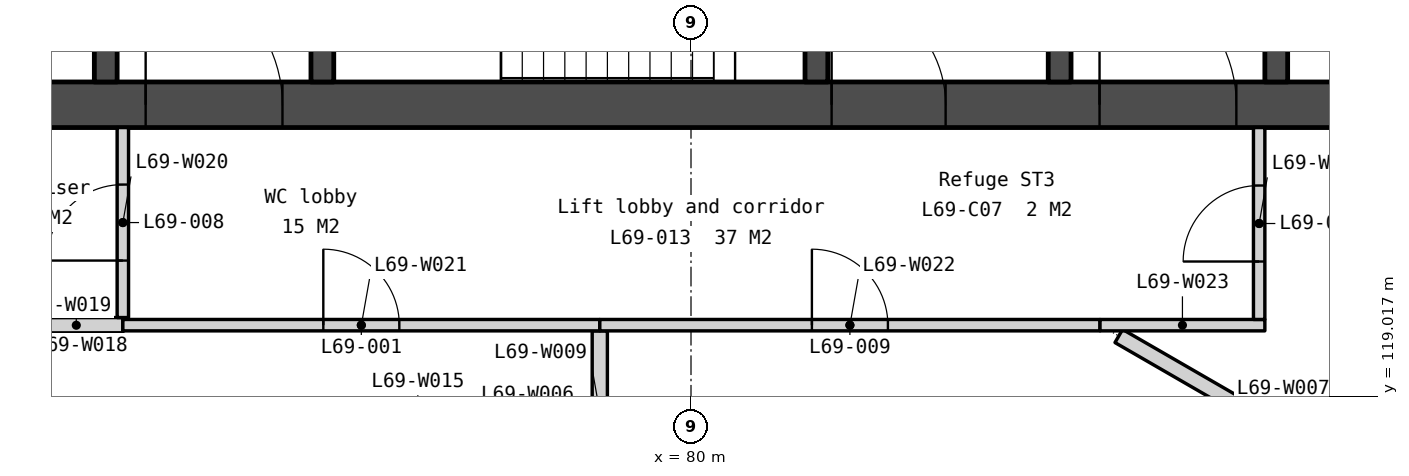
"""IFC4 building model, lengths in metres.
Left out: names, types, materials, properties, quantities, classifications, styles, units other than length and angle.
Written with IfcOpenShell. Run it as: python <this file> out.ifc"""

import sys

from ifc_helpers import new_model, si_unit, direction, frame, frame_2d, origin, place, context, subcontext, project, spatial, polyline, rectangle, outline, extrude, element, fill, save


model = new_model("IFC4")
c1 = context("Model", 3, precision=1e-05, world=origin(), true_north=direction((0.0, 1.0)))
c2 = subcontext(c1, "Body", "Model", "MODEL_VIEW")
j1 = project(units=[si_unit("LENGTHUNIT", "METRE"), si_unit("PLANEANGLEUNIT", "RADIAN")], contexts=[c1])
p1 = place(None, origin())
s1 = spatial("IfcSite", under=j1, at=p1, CompositionType="ELEMENT")
p2 = place(p1, origin())
s2 = spatial("IfcBuilding", under=s1, at=p2, CompositionType="ELEMENT")
p3 = place(p2, frame((0.0, 0.0, 281.6)))
s3 = spatial("IfcBuildingStorey", under=s2, at=p3, CompositionType="ELEMENT", Elevation=281.6)
p4 = place(p3, frame((69.0, 122.85, 0.0), z_axis=(0.0, 0.0, 1.0), x_axis=(1.0, 0.0, 0.0)))
e1 = element("IfcWall", 1, at=p4, inside=s3, PredefinedType="SOLIDWALL", context=c2, shape_type="SweptSolid", body=[
    extrude(rectangle(XDim=22.0, YDim=0.6, at=frame_2d((11.0, 0.0))), origin(), (0.0, 0.0, 1.0), 3.5),
])
p5 = place(p4, frame((16.375, 0.0, 0.0)))
e2 = element("IfcOpeningElement", 2, at=p5, cuts=e1, PredefinedType="OPENING", context=c2, shape_type="SweptSolid", body=[
    extrude(rectangle(XDim=1.8, YDim=2.1, at=frame_2d((0.9, 1.05))), frame((0.0, 0.31, 0.0), z_axis=(0.0, -1.0, 0.0), x_axis=(1.0, 0.0, 0.0)), (0.0, 0.0, 1.0), 0.62),
])
p6 = place(p4, frame((3.825, 0.0, 0.0)))
e3 = element("IfcOpeningElement", 3, at=p6, cuts=e1, PredefinedType="OPENING", context=c2, shape_type="SweptSolid", body=[
    extrude(rectangle(XDim=1.8, YDim=2.1, at=frame_2d((0.9, 1.05))), frame((0.0, 0.31, 0.0), z_axis=(0.0, -1.0, 0.0), x_axis=(1.0, 0.0, 0.0)), (0.0, 0.0, 1.0), 0.62),
])
p7 = place(p4, frame((12.85, 0.0, 0.0)))
e4 = element("IfcOpeningElement", 4, at=p7, cuts=e1, PredefinedType="OPENING", context=c2, shape_type="SweptSolid", body=[
    extrude(rectangle(XDim=1.5, YDim=2.1, at=frame_2d((0.75, 1.05))), frame((0.0, 0.31, 0.0), z_axis=(0.0, -1.0, 0.0), x_axis=(1.0, 0.0, 0.0)), (0.0, 0.0, 1.0), 0.62),
])
p8 = place(p3, frame((72.3, 133.95, 0.0), z_axis=(0.0, 0.0, 1.0), x_axis=(0.0, -1.0, 0.0)))
e5 = element("IfcWall", 5, at=p8, inside=s3, PredefinedType="SOLIDWALL", context=c2, shape_type="SweptSolid", body=[
    extrude(rectangle(XDim=10.8, YDim=0.3, at=frame_2d((5.4, 0.0))), origin(), (0.0, 0.0, 1.0), 3.5),
])
p9 = place(p8, frame((6.95, 0.0, 0.0)))
e6 = element("IfcOpeningElement", 6, at=p9, cuts=e5, PredefinedType="OPENING", context=c2, shape_type="SweptSolid", body=[
    extrude(rectangle(XDim=1.1, YDim=2.1, at=frame_2d((0.55, 1.05))), frame((0.0, 0.16, 0.0), z_axis=(0.0, -1.0, 0.0), x_axis=(1.0, 0.0, 0.0)), (0.0, 0.0, 1.0), 0.32),
])
p10 = place(p8, frame((9.35, 0.0, 0.0)))
e7 = element("IfcOpeningElement", 7, at=p10, cuts=e5, PredefinedType="OPENING", context=c2, shape_type="SweptSolid", body=[
    extrude(rectangle(XDim=0.9, YDim=2.1, at=frame_2d((0.45, 1.05))), frame((0.0, 0.16, 0.0), z_axis=(0.0, -1.0, 0.0), x_axis=(1.0, 0.0, 0.0)), (0.0, 0.0, 1.0), 0.32),
])
p11 = place(p8, frame((5.1, 0.0, 0.0)))
e8 = element("IfcOpeningElement", 8, at=p11, cuts=e5, PredefinedType="OPENING", context=c2, shape_type="SweptSolid", body=[
    extrude(rectangle(XDim=1.0, YDim=2.1, at=frame_2d((0.5, 1.05))), frame((0.0, 0.16, 0.0), z_axis=(0.0, -1.0, 0.0), x_axis=(1.0, 0.0, 0.0)), (0.0, 0.0, 1.0), 0.32),
])
p12 = place(p3, frame((75.15, 125.7, 0.0), z_axis=(0.0, 0.0, 1.0), x_axis=(0.0, -1.0, 0.0)))
e9 = element("IfcWall", 9, at=p12, inside=s3, PredefinedType="SOLIDWALL", context=c2, shape_type="SweptSolid", body=[
    extrude(rectangle(XDim=2.55, YDim=0.3, at=frame_2d((1.275, 0.0))), origin(), (0.0, 0.0, 1.0), 3.5),
])
p13 = place(p3, frame((81.65, 125.7, 0.0), z_axis=(0.0, 0.0, 1.0), x_axis=(0.0, -1.0, 0.0)))
e10 = element("IfcWall", 10, at=p13, inside=s3, PredefinedType="SOLIDWALL", context=c2, shape_type="SweptSolid", body=[
    extrude(rectangle(XDim=2.55, YDim=0.3, at=frame_2d((1.275, 0.0))), origin(), (0.0, 0.0, 1.0), 3.5),
])
p14 = place(p13, frame((0.75, 0.0, 0.0)))
e11 = element("IfcOpeningElement", 11, at=p14, cuts=e10, PredefinedType="OPENING", context=c2, shape_type="SweptSolid", body=[
    extrude(rectangle(XDim=1.0, YDim=2.1, at=frame_2d((0.5, 1.05))), frame((0.0, 0.16, 0.0), z_axis=(0.0, -1.0, 0.0), x_axis=(1.0, 0.0, 0.0)), (0.0, 0.0, 1.0), 0.32),
])
p15 = place(p3, frame((84.85, 125.85, 0.0), z_axis=(0.0, 0.0, 1.0), x_axis=(0.0, -1.0, 0.0)))
e12 = element("IfcWall", 12, at=p15, inside=s3, PredefinedType="SOLIDWALL", context=c2, shape_type="SweptSolid", body=[
    extrude(rectangle(XDim=2.7, YDim=0.3, at=frame_2d((1.35, 0.0))), origin(), (0.0, 0.0, 1.0), 3.5),
])
p16 = place(p3, frame((87.7, 133.95, 0.0), z_axis=(0.0, 0.0, 1.0), x_axis=(0.0, -1.0, 0.0)))
e13 = element("IfcWall", 13, at=p16, inside=s3, PredefinedType="SOLIDWALL", context=c2, shape_type="SweptSolid", body=[
    extrude(rectangle(XDim=10.8, YDim=0.3, at=frame_2d((5.4, 0.0))), origin(), (0.0, 0.0, 1.0), 3.5),
])
p17 = place(p16, frame((6.95, 0.0, 0.0)))
e14 = element("IfcOpeningElement", 14, at=p17, cuts=e13, PredefinedType="OPENING", context=c2, shape_type="SweptSolid", body=[
    extrude(rectangle(XDim=1.1, YDim=2.1, at=frame_2d((0.55, 1.05))), frame((0.0, 0.16, 0.0), z_axis=(0.0, -1.0, 0.0), x_axis=(1.0, 0.0, 0.0)), (0.0, 0.0, 1.0), 0.32),
])
p18 = place(p16, frame((5.1, 0.0, 0.0)))
e15 = element("IfcOpeningElement", 15, at=p18, cuts=e13, PredefinedType="OPENING", context=c2, shape_type="SweptSolid", body=[
    extrude(rectangle(XDim=1.0, YDim=2.1, at=frame_2d((0.5, 1.05))), frame((0.0, 0.16, 0.0), z_axis=(0.0, -1.0, 0.0), x_axis=(1.0, 0.0, 0.0)), (0.0, 0.0, 1.0), 0.32),
])
p19 = place(p16, frame((9.25, 0.0, 0.0)))
e16 = element("IfcOpeningElement", 16, at=p19, cuts=e13, PredefinedType="OPENING", context=c2, shape_type="SweptSolid", body=[
    extrude(rectangle(XDim=1.1, YDim=2.1, at=frame_2d((0.55, 1.05))), frame((0.0, 0.16, 0.0), z_axis=(0.0, -1.0, 0.0), x_axis=(1.0, 0.0, 0.0)), (0.0, 0.0, 1.0), 0.32),
])
p20 = place(p3, frame((60.609, 133.207, -0.15), z_axis=(0.0, 0.0, 1.0), x_axis=(0.500002536638, -0.866023939251, 0.0)))
e17 = element("IfcWall", 17, at=p20, inside=s3, PredefinedType="SOLIDWALL", context=c2, shape_type="SweptSolid", body=[
    extrude(outline(polyline([(36.972, 0.0), (36.972, 3.55), (0.0, 3.55), (0.0, 0.0), (36.972, 0.0)])), frame((0.0, 0.225, 0.0), z_axis=(0.0, -1.0, 0.0), x_axis=(1.0, 0.0, 0.0)), (0.0, 0.0, 1.0), 0.45),
])
p21 = place(p20, frame((3.172, 0.0, 0.95)))
e18 = element("IfcOpeningElement", 18, at=p21, cuts=e17, PredefinedType="OPENING", context=c2, shape_type="SweptSolid", body=[
    extrude(rectangle(XDim=1.2, YDim=2.2, at=frame_2d((0.6, 1.1))), frame((0.0, 0.235, 0.0), z_axis=(0.0, -1.0, 0.0), x_axis=(1.0, 0.0, 0.0)), (0.0, 0.0, 1.0), 0.47),
])
p22 = place(p20, frame((4.872, 0.0, 0.95)))
e19 = element("IfcOpeningElement", 19, at=p22, cuts=e17, PredefinedType="OPENING", context=c2, shape_type="SweptSolid", body=[
    extrude(rectangle(XDim=1.2, YDim=2.2, at=frame_2d((0.6, 1.1))), frame((0.0, 0.235, 0.0), z_axis=(0.0, -1.0, 0.0), x_axis=(1.0, 0.0, 0.0)), (0.0, 0.0, 1.0), 0.47),
])
p23 = place(p20, frame((12.415, 0.0, 0.95)))
e20 = element("IfcOpeningElement", 20, at=p23, cuts=e17, PredefinedType="OPENING", context=c2, shape_type="SweptSolid", body=[
    extrude(rectangle(XDim=1.2, YDim=2.2, at=frame_2d((0.6, 1.1))), frame((0.0, 0.235, 0.0), z_axis=(0.0, -1.0, 0.0), x_axis=(1.0, 0.0, 0.0)), (0.0, 0.0, 1.0), 0.47),
])
p24 = place(p20, frame((14.115, 0.0, 0.95)))
e21 = element("IfcOpeningElement", 21, at=p24, cuts=e17, PredefinedType="OPENING", context=c2, shape_type="SweptSolid", body=[
    extrude(rectangle(XDim=1.2, YDim=2.2, at=frame_2d((0.6, 1.1))), frame((0.0, 0.235, 0.0), z_axis=(0.0, -1.0, 0.0), x_axis=(1.0, 0.0, 0.0)), (0.0, 0.0, 1.0), 0.47),
])
p25 = place(p20, frame((21.658, 0.0, 0.95)))
e22 = element("IfcOpeningElement", 22, at=p25, cuts=e17, PredefinedType="OPENING", context=c2, shape_type="SweptSolid", body=[
    extrude(rectangle(XDim=1.2, YDim=2.2, at=frame_2d((0.6, 1.1))), frame((0.0, 0.235, 0.0), z_axis=(0.0, -1.0, 0.0), x_axis=(1.0, 0.0, 0.0)), (0.0, 0.0, 1.0), 0.47),
])
p26 = place(p20, frame((23.358, 0.0, 0.95)))
e23 = element("IfcOpeningElement", 23, at=p26, cuts=e17, PredefinedType="OPENING", context=c2, shape_type="SweptSolid", body=[
    extrude(rectangle(XDim=1.2, YDim=2.2, at=frame_2d((0.6, 1.1))), frame((0.0, 0.235, 0.0), z_axis=(0.0, -1.0, 0.0), x_axis=(1.0, 0.0, 0.0)), (0.0, 0.0, 1.0), 0.47),
])
p27 = place(p20, frame((30.901, 0.0, 0.95)))
e24 = element("IfcOpeningElement", 24, at=p27, cuts=e17, PredefinedType="OPENING", context=c2, shape_type="SweptSolid", body=[
    extrude(rectangle(XDim=1.2, YDim=2.2, at=frame_2d((0.6, 1.1))), frame((0.0, 0.235, 0.0), z_axis=(0.0, -1.0, 0.0), x_axis=(1.0, 0.0, 0.0)), (0.0, 0.0, 1.0), 0.47),
])
p28 = place(p20, frame((32.601, 0.0, 0.95)))
e25 = element("IfcOpeningElement", 25, at=p28, cuts=e17, PredefinedType="OPENING", context=c2, shape_type="SweptSolid", body=[
    extrude(rectangle(XDim=1.2, YDim=2.2, at=frame_2d((0.6, 1.1))), frame((0.0, 0.235, 0.0), z_axis=(0.0, -1.0, 0.0), x_axis=(1.0, 0.0, 0.0)), (0.0, 0.0, 1.0), 0.47),
])
p29 = place(p3, frame((80.905, 101.188, -0.15), z_axis=(0.0, 0.0, 1.0), x_axis=(0.500002536638, 0.866023939251, 0.0)))
e26 = element("IfcWall", 26, at=p29, inside=s3, PredefinedType="SOLIDWALL", context=c2, shape_type="SweptSolid", body=[
    extrude(outline(polyline([(36.972, 0.0), (36.972, 3.55), (0.0, 3.55), (0.0, 0.0), (36.972, 0.0)])), frame((0.0, 0.225, 0.0), z_axis=(0.0, -1.0, 0.0), x_axis=(1.0, 0.0, 0.0)), (0.0, 0.0, 1.0), 0.45),
])
p30 = place(p29, frame((3.172, 0.0, 0.95)))
e27 = element("IfcOpeningElement", 27, at=p30, cuts=e26, PredefinedType="OPENING", context=c2, shape_type="SweptSolid", body=[
    extrude(rectangle(XDim=1.2, YDim=2.2, at=frame_2d((0.6, 1.1))), frame((0.0, 0.235, 0.0), z_axis=(0.0, -1.0, 0.0), x_axis=(1.0, 0.0, 0.0)), (0.0, 0.0, 1.0), 0.47),
])
p31 = place(p29, frame((4.872, 0.0, 0.95)))
e28 = element("IfcOpeningElement", 28, at=p31, cuts=e26, PredefinedType="OPENING", context=c2, shape_type="SweptSolid", body=[
    extrude(rectangle(XDim=1.2, YDim=2.2, at=frame_2d((0.6, 1.1))), frame((0.0, 0.235, 0.0), z_axis=(0.0, -1.0, 0.0), x_axis=(1.0, 0.0, 0.0)), (0.0, 0.0, 1.0), 0.47),
])
p32 = place(p29, frame((12.415, 0.0, 0.95)))
e29 = element("IfcOpeningElement", 29, at=p32, cuts=e26, PredefinedType="OPENING", context=c2, shape_type="SweptSolid", body=[
    extrude(rectangle(XDim=1.2, YDim=2.2, at=frame_2d((0.6, 1.1))), frame((0.0, 0.235, 0.0), z_axis=(0.0, -1.0, 0.0), x_axis=(1.0, 0.0, 0.0)), (0.0, 0.0, 1.0), 0.47),
])
p33 = place(p29, frame((14.115, 0.0, 0.95)))
e30 = element("IfcOpeningElement", 30, at=p33, cuts=e26, PredefinedType="OPENING", context=c2, shape_type="SweptSolid", body=[
    extrude(rectangle(XDim=1.2, YDim=2.2, at=frame_2d((0.6, 1.1))), frame((0.0, 0.235, 0.0), z_axis=(0.0, -1.0, 0.0), x_axis=(1.0, 0.0, 0.0)), (0.0, 0.0, 1.0), 0.47),
])
p34 = place(p29, frame((21.658, 0.0, 0.95)))
e31 = element("IfcOpeningElement", 31, at=p34, cuts=e26, PredefinedType="OPENING", context=c2, shape_type="SweptSolid", body=[
    extrude(rectangle(XDim=1.2, YDim=2.2, at=frame_2d((0.6, 1.1))), frame((0.0, 0.235, 0.0), z_axis=(0.0, -1.0, 0.0), x_axis=(1.0, 0.0, 0.0)), (0.0, 0.0, 1.0), 0.47),
])
p35 = place(p29, frame((23.358, 0.0, 0.95)))
e32 = element("IfcOpeningElement", 32, at=p35, cuts=e26, PredefinedType="OPENING", context=c2, shape_type="SweptSolid", body=[
    extrude(rectangle(XDim=1.2, YDim=2.2, at=frame_2d((0.6, 1.1))), frame((0.0, 0.235, 0.0), z_axis=(0.0, -1.0, 0.0), x_axis=(1.0, 0.0, 0.0)), (0.0, 0.0, 1.0), 0.47),
])
p36 = place(p29, frame((30.901, 0.0, 0.95)))
e33 = element("IfcOpeningElement", 33, at=p36, cuts=e26, PredefinedType="OPENING", context=c2, shape_type="SweptSolid", body=[
    extrude(rectangle(XDim=1.2, YDim=2.2, at=frame_2d((0.6, 1.1))), frame((0.0, 0.235, 0.0), z_axis=(0.0, -1.0, 0.0), x_axis=(1.0, 0.0, 0.0)), (0.0, 0.0, 1.0), 0.47),
])
p37 = place(p29, frame((32.601, 0.0, 0.95)))
e34 = element("IfcOpeningElement", 34, at=p37, cuts=e26, PredefinedType="OPENING", context=c2, shape_type="SweptSolid", body=[
    extrude(rectangle(XDim=1.2, YDim=2.2, at=frame_2d((0.6, 1.1))), frame((0.0, 0.235, 0.0), z_axis=(0.0, -1.0, 0.0), x_axis=(1.0, 0.0, 0.0)), (0.0, 0.0, 1.0), 0.47),
])
p38 = place(p3, frame((85.628, 119.808, 0.0), z_axis=(0.0, 0.0, 1.0), x_axis=(0.86602359872, -0.50000312645, 0.0)))
e35 = element("IfcWall", 35, at=p38, inside=s3, PredefinedType="PARTITIONING", context=c2, shape_type="SweptSolid", body=[
    extrude(rectangle(XDim=4.995, YDim=0.2, at=frame_2d((2.497, 0.0))), origin(), (0.0, 0.0, 1.0), 3.5),
])
p39 = place(p3, frame((78.8, 117.74, 0.0), z_axis=(0.0, 0.0, 1.0), x_axis=(0.0, 1.0, 0.0)))
e36 = element("IfcWall", 36, at=p39, inside=s3, PredefinedType="PARTITIONING", context=c2, shape_type="SweptSolid", body=[
    extrude(rectangle(XDim=2.135, YDim=0.2, at=frame_2d((1.067, 0.0))), origin(), (0.0, 0.0, 1.0), 3.5),
])
p40 = place(p3, frame((71.3, 119.948, 0.0), z_axis=(0.0, 0.0, 1.0), x_axis=(0.999999026632, 0.001395254771, 0.0)))
e37 = element("IfcWall", 37, at=p40, inside=s3, PredefinedType="PARTITIONING", context=c2, shape_type="SweptSolid", body=[
    extrude(rectangle(XDim=1.225, YDim=0.2, at=frame_2d((0.612, 0.0))), origin(), (0.0, 0.0, 1.0), 3.5),
])
p41 = place(p3, frame((72.525, 120.05, 0.0), z_axis=(0.0, 0.0, 1.0), x_axis=(0.0, 1.0, 0.0)))
e38 = element("IfcWall", 38, at=p41, inside=s3, PredefinedType="PARTITIONING", context=c2, shape_type="SweptSolid", body=[
    extrude(rectangle(XDim=2.5, YDim=0.15, at=frame_2d((1.25, 0.0))), origin(), (0.0, 0.0, 1.0), 3.5),
])
p42 = place(p41, frame((0.75, 0.0, 0.0)))
e39 = element("IfcOpeningElement", 39, at=p42, cuts=e38, PredefinedType="OPENING", context=c2, shape_type="SweptSolid", body=[
    extrude(rectangle(XDim=1.0, YDim=2.1, at=frame_2d((0.5, 1.05))), frame((0.0, 0.085, 0.0), z_axis=(0.0, -1.0, 0.0), x_axis=(1.0, 0.0, 0.0)), (0.0, 0.0, 1.0), 0.17),
])
p43 = place(p3, frame((72.525, 119.95, 0.0), z_axis=(0.0, 0.0, 1.0), x_axis=(1.0, 0.0, 0.0)))
e40 = element("IfcWall", 40, at=p43, inside=s3, PredefinedType="PARTITIONING", context=c2, shape_type="SweptSolid", body=[
    extrude(rectangle(XDim=6.275, YDim=0.15, at=frame_2d((3.138, 0.0))), origin(), (0.0, 0.0, 1.0), 3.5),
])
p44 = place(p43, frame((2.637, 0.0, 0.0)))
e41 = element("IfcOpeningElement", 41, at=p44, cuts=e40, PredefinedType="OPENING", context=c2, shape_type="SweptSolid", body=[
    extrude(rectangle(XDim=1.0, YDim=2.1, at=frame_2d((0.5, 1.05))), frame((0.0, 0.085, 0.0), z_axis=(0.0, -1.0, 0.0), x_axis=(1.0, 0.0, 0.0)), (0.0, 0.0, 1.0), 0.17),
])
p45 = place(p3, frame((78.8, 119.95, 0.0), z_axis=(0.0, 0.0, 1.0), x_axis=(1.0, 0.0, 0.0)))
e42 = element("IfcWall", 42, at=p45, inside=s3, PredefinedType="PARTITIONING", context=c2, shape_type="SweptSolid", body=[
    extrude(rectangle(XDim=6.581, YDim=0.15, at=frame_2d((3.291, 0.0))), origin(), (0.0, 0.0, 1.0), 3.5),
])
p46 = place(p45, frame((2.791, 0.0, 0.0)))
e43 = element("IfcOpeningElement", 43, at=p46, cuts=e42, PredefinedType="OPENING", context=c2, shape_type="SweptSolid", body=[
    extrude(rectangle(XDim=1.0, YDim=2.1, at=frame_2d((0.5, 1.05))), frame((0.0, 0.085, 0.0), z_axis=(0.0, -1.0, 0.0), x_axis=(1.0, 0.0, 0.0)), (0.0, 0.0, 1.0), 0.17),
])
p47 = place(p3, frame((85.381, 119.95, 0.0), z_axis=(0.0, 0.0, 1.0), x_axis=(1.0, 0.0, 0.0)))
e44 = element("IfcWall", 44, at=p47, inside=s3, PredefinedType="PARTITIONING", context=c2, shape_type="SweptSolid", body=[
    extrude(rectangle(XDim=2.169, YDim=0.15, at=frame_2d((1.084, 0.0))), origin(), (0.0, 0.0, 1.0), 3.5),
])
p48 = place(p3, frame((87.475, 120.025, 0.0), z_axis=(0.0, 0.0, 1.0), x_axis=(0.0, 1.0, 0.0)))
e45 = element("IfcWall", 45, at=p48, inside=s3, PredefinedType="PARTITIONING", context=c2, shape_type="SweptSolid", body=[
    extrude(rectangle(XDim=2.525, YDim=0.15, at=frame_2d((1.263, 0.0))), origin(), (0.0, 0.0, 1.0), 3.5),
])
p49 = place(p48, frame((0.762, 0.0, 0.0)))
e46 = element("IfcOpeningElement", 46, at=p49, cuts=e45, PredefinedType="OPENING", context=c2, shape_type="SweptSolid", body=[
    extrude(rectangle(XDim=1.0, YDim=2.1, at=frame_2d((0.5, 1.05))), frame((0.0, 0.085, 0.0), z_axis=(0.0, -1.0, 0.0), x_axis=(1.0, 0.0, 0.0)), (0.0, 0.0, 1.0), 0.17),
])
p50 = place(p5, origin())
e47 = element("IfcDoor", 47, at=p50, inside=s3, OperationType="DOUBLE_DOOR_DOUBLE_SWING", PredefinedType="DOOR", context=c2, shape_type="SweptSolid", body=[
    extrude(rectangle(XDim=1.8, YDim=2.1, at=frame_2d((0.9, 1.05))), frame((0.0, 0.025, 0.0), z_axis=(0.0, -1.0, 0.0), x_axis=(1.0, 0.0, 0.0)), (0.0, 0.0, 1.0), 0.05),
])
fill(e2, e47)
p51 = place(p6, origin())
e48 = element("IfcDoor", 48, at=p51, inside=s3, OperationType="DOUBLE_DOOR_DOUBLE_SWING", PredefinedType="DOOR", context=c2, shape_type="SweptSolid", body=[
    extrude(rectangle(XDim=1.8, YDim=2.1, at=frame_2d((0.9, 1.05))), frame((0.0, 0.025, 0.0), z_axis=(0.0, -1.0, 0.0), x_axis=(1.0, 0.0, 0.0)), (0.0, 0.0, 1.0), 0.05),
])
fill(e3, e48)
p52 = place(p7, origin())
e49 = element("IfcDoor", 49, at=p52, inside=s3, OperationType="DOUBLE_DOOR_DOUBLE_SWING", PredefinedType="DOOR", context=c2, shape_type="SweptSolid", body=[
    extrude(rectangle(XDim=1.5, YDim=2.1, at=frame_2d((0.75, 1.05))), frame((0.0, 0.025, 0.0), z_axis=(0.0, -1.0, 0.0), x_axis=(1.0, 0.0, 0.0)), (0.0, 0.0, 1.0), 0.05),
])
fill(e4, e49)
p53 = place(p44, origin())
e50 = element("IfcDoor", 50, at=p53, inside=s3, OperationType="SINGLE_SWING_LEFT", PredefinedType="DOOR", context=c2, shape_type="SweptSolid", body=[
    extrude(rectangle(XDim=1.0, YDim=2.1, at=frame_2d((0.5, 1.05))), frame((0.0, 0.025, 0.0), z_axis=(0.0, -1.0, 0.0), x_axis=(1.0, 0.0, 0.0)), (0.0, 0.0, 1.0), 0.05),
])
fill(e41, e50)
p54 = place(p42, origin())
e51 = element("IfcDoor", 51, at=p54, inside=s3, OperationType="SINGLE_SWING_LEFT", PredefinedType="DOOR", context=c2, shape_type="SweptSolid", body=[
    extrude(rectangle(XDim=1.0, YDim=2.1, at=frame_2d((0.5, 1.05))), frame((0.0, 0.025, 0.0), z_axis=(0.0, -1.0, 0.0), x_axis=(1.0, 0.0, 0.0)), (0.0, 0.0, 1.0), 0.05),
])
fill(e39, e51)
p55 = place(p46, origin())
e52 = element("IfcDoor", 52, at=p55, inside=s3, OperationType="SINGLE_SWING_LEFT", PredefinedType="DOOR", context=c2, shape_type="SweptSolid", body=[
    extrude(rectangle(XDim=1.0, YDim=2.1, at=frame_2d((0.5, 1.05))), frame((0.0, 0.025, 0.0), z_axis=(0.0, -1.0, 0.0), x_axis=(1.0, 0.0, 0.0)), (0.0, 0.0, 1.0), 0.05),
])
fill(e43, e52)
p56 = place(p49, origin())
e53 = element("IfcDoor", 53, at=p56, inside=s3, OperationType="SINGLE_SWING_LEFT", PredefinedType="DOOR", context=c2, shape_type="SweptSolid", body=[
    extrude(rectangle(XDim=1.0, YDim=2.1, at=frame_2d((0.5, 1.05))), frame((0.0, 0.025, 0.0), z_axis=(0.0, -1.0, 0.0), x_axis=(1.0, 0.0, 0.0)), (0.0, 0.0, 1.0), 0.05),
])
fill(e46, e53)
save(model, sys.argv[1])
